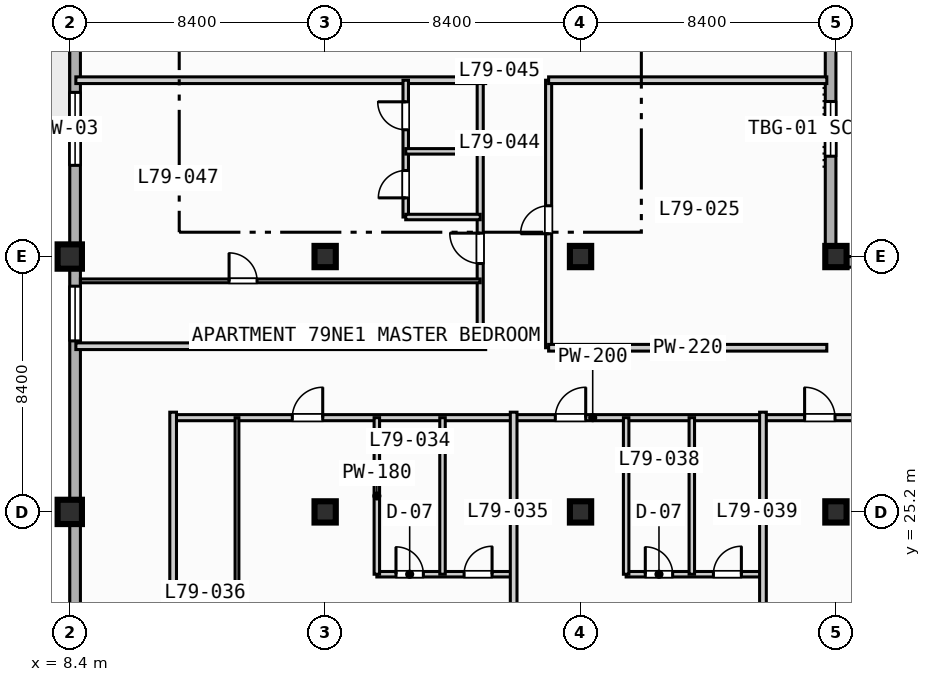
"""IFC4 building model, lengths in metres.
Left out: names, types, materials, properties, quantities, classifications, styles, units other than length and angle.
Written with IfcOpenShell. Run it as: python <this file> out.ifc"""

import sys

from ifc_helpers import new_model, si_unit, direction, frame, frame_2d, origin, origin_2d, place, context, subcontext, project, spatial, rectangle, extrude, element, fill, save


model = new_model("IFC4")
c1 = context("Model", 3, precision=1e-05, world=origin(), true_north=direction((0.0, 1.0)))
c2 = subcontext(c1, "Body", "Model", "MODEL_VIEW")
j1 = project(units=[si_unit("LENGTHUNIT", "METRE"), si_unit("PLANEANGLEUNIT", "RADIAN")], contexts=[c1])
p1 = place(None, origin())
s1 = spatial("IfcSite", under=j1, at=p1, CompositionType="ELEMENT")
p2 = place(p1, origin())
s2 = spatial("IfcBuilding", under=s1, at=p2, CompositionType="ELEMENT")
p3 = place(p2, frame((0.0, 0.0, 320.3)))
s3 = spatial("IfcBuildingStorey", under=s2, at=p3, CompositionType="ELEMENT", Elevation=320.3)
for number, where, z_axis, x_axis in (
    (1, (8.4, 25.2, 0.0), (0.0, 0.0, 1.0), (1.0, 0.0, 0.0)),
    (2, (8.4, 33.6, 0.0), (0.0, 0.0, 1.0), (1.0, 0.0, 0.0)),
):
    element("IfcColumn", number, at=place(p3, frame(where, z_axis=z_axis, x_axis=x_axis)), inside=s3, PredefinedType="COLUMN", context=c2, shape_type="SweptSolid", body=[
        extrude(rectangle(XDim=0.8, YDim=0.8, at=origin_2d()), origin(), (0.0, 0.0, 1.0), 3.9),
    ])
for number, where, z_axis, x_axis in (
    (3, (16.8, 25.2, 0.0), (0.0, 0.0, 1.0), (1.0, 0.0, 0.0)),
    (4, (16.8, 33.6, 0.0), (0.0, 0.0, 1.0), (1.0, 0.0, 0.0)),
    (5, (25.2, 25.2, 0.0), (0.0, 0.0, 1.0), (1.0, 0.0, 0.0)),
    (6, (25.2, 33.6, 0.0), (0.0, 0.0, 1.0), (1.0, 0.0, 0.0)),
    (7, (33.6, 25.2, 0.0), (0.0, 0.0, 1.0), (1.0, 0.0, 0.0)),
    (8, (33.6, 33.6, 0.0), (0.0, 0.0, 1.0), (1.0, 0.0, 0.0)),
):
    element("IfcColumn", number, at=place(p3, frame(where, z_axis=z_axis, x_axis=x_axis)), inside=s3, PredefinedType="COLUMN", context=c2, shape_type="SweptSolid", body=[
        extrude(rectangle(XDim=0.7, YDim=0.7, at=origin_2d()), origin(), (0.0, 0.0, 1.0), 3.9),
    ])
p4 = place(p3, frame((8.575, 11.575, 0.0), z_axis=(0.0, 0.0, 1.0), x_axis=(0.0, 1.0, 0.0)))
e9 = element("IfcWall", 9, at=p4, inside=s3, PredefinedType="STANDARD", context=c2, shape_type="SweptSolid", body=[
    extrude(rectangle(XDim=60.85, YDim=0.35, at=frame_2d((30.425, 0.0))), origin(), (0.0, 0.0, 1.0), 3.67),
])
p5 = place(p4, frame((33.925, 0.0, 0.0)))
e10 = element("IfcOpeningElement", 10, at=p5, cuts=e9, PredefinedType="OPENING", context=c2, shape_type="SweptSolid", body=[
    extrude(rectangle(XDim=1.4, YDim=2.2, at=frame_2d((0.7, 1.1))), frame((0.0, 0.185, 0.0), z_axis=(0.0, -1.0, 0.0), x_axis=(1.0, 0.0, 0.0)), (0.0, 0.0, 1.0), 0.37),
])
p6 = place(p4, frame((25.025, 0.0, 0.85)))
e11 = element("IfcOpeningElement", 11, at=p6, cuts=e9, PredefinedType="OPENING", context=c2, shape_type="SweptSolid", body=[
    extrude(rectangle(XDim=2.4, YDim=1.95, at=frame_2d((1.2, 0.975))), frame((0.0, 0.185, 0.0), z_axis=(0.0, -1.0, 0.0), x_axis=(1.0, 0.0, 0.0)), (0.0, 0.0, 1.0), 0.37),
])
p7 = place(p4, frame((41.825, 0.0, 0.85)))
e12 = element("IfcOpeningElement", 12, at=p7, cuts=e9, PredefinedType="OPENING", context=c2, shape_type="SweptSolid", body=[
    extrude(rectangle(XDim=2.4, YDim=1.95, at=frame_2d((1.2, 0.975))), frame((0.0, 0.185, 0.0), z_axis=(0.0, -1.0, 0.0), x_axis=(1.0, 0.0, 0.0)), (0.0, 0.0, 1.0), 0.37),
])
p8 = place(p4, frame((19.25, 0.0, 0.85)))
e13 = element("IfcOpeningElement", 13, at=p8, cuts=e9, PredefinedType="OPENING", context=c2, shape_type="SweptSolid", body=[
    extrude(rectangle(XDim=1.8, YDim=1.8, at=frame_2d((0.9, 0.9))), frame((0.0, 0.185, 0.0), z_axis=(0.0, -1.0, 0.0), x_axis=(1.0, 0.0, 0.0)), (0.0, 0.0, 1.0), 0.37),
])
p9 = place(p3, frame((33.425, 72.425, 0.0), z_axis=(0.0, 0.0, 1.0), x_axis=(0.0, -1.0, 0.0)))
e14 = element("IfcWall", 14, at=p9, inside=s3, PredefinedType="STANDARD", context=c2, shape_type="SweptSolid", body=[
    extrude(rectangle(XDim=39.0, YDim=0.35, at=frame_2d((19.5, 0.0))), origin(), (0.0, 0.0, 1.0), 3.67),
])
p10 = place(p9, frame((33.725, 0.0, 0.85)))
e15 = element("IfcOpeningElement", 15, at=p10, cuts=e14, PredefinedType="OPENING", context=c2, shape_type="SweptSolid", body=[
    extrude(rectangle(XDim=1.8, YDim=1.8, at=frame_2d((0.9, 0.9))), frame((0.0, 0.185, 0.0), z_axis=(0.0, -1.0, 0.0), x_axis=(1.0, 0.0, 0.0)), (0.0, 0.0, 1.0), 0.37),
])
p11 = place(p9, frame((8.225, 0.0, 0.85)))
e16 = element("IfcOpeningElement", 16, at=p11, cuts=e14, PredefinedType="OPENING", context=c2, shape_type="SweptSolid", body=[
    extrude(rectangle(XDim=2.4, YDim=1.95, at=frame_2d((1.2, 0.975))), frame((0.0, 0.185, 0.0), z_axis=(0.0, -1.0, 0.0), x_axis=(1.0, 0.0, 0.0)), (0.0, 0.0, 1.0), 0.37),
])
p12 = place(p3, frame((33.425, 33.425, 0.0), z_axis=(0.0, 0.0, 1.0), x_axis=(1.0, 0.0, 0.0)))
e17 = element("IfcWall", 17, at=p12, inside=s3, PredefinedType="STANDARD", context=c2, shape_type="SweptSolid", body=[
    extrude(rectangle(XDim=30.6, YDim=0.35, at=frame_2d((15.3, 0.0))), origin(), (0.0, 0.0, 1.0), 3.67),
])
p13 = place(p12, frame((12.075, 0.0, 0.0)))
e18 = element("IfcOpeningElement", 18, at=p13, cuts=e17, PredefinedType="OPENING", context=c2, shape_type="SweptSolid", body=[
    extrude(rectangle(XDim=1.4, YDim=2.2, at=frame_2d((0.7, 1.1))), frame((0.0, 0.185, 0.0), z_axis=(0.0, -1.0, 0.0), x_axis=(1.0, 0.0, 0.0)), (0.0, 0.0, 1.0), 0.37),
])
p14 = place(p3, frame((24.15, 30.6, 0.0), z_axis=(0.0, 0.0, 1.0), x_axis=(0.0, 1.0, 0.0)))
e19 = element("IfcWall", 19, at=p14, inside=s3, PredefinedType="PARTITIONING", context=c2, shape_type="SweptSolid", body=[
    extrude(rectangle(XDim=8.8, YDim=0.2, at=frame_2d((4.4, 0.0))), origin(), (0.0, 0.0, 1.0), 3.67),
])
p15 = place(p14, frame((3.75, 0.0, 0.0)))
e20 = element("IfcOpeningElement", 20, at=p15, cuts=e19, PredefinedType="OPENING", context=c2, shape_type="SweptSolid", body=[
    extrude(rectangle(XDim=0.92, YDim=2.1, at=frame_2d((0.46, 1.05))), frame((0.0, 0.11, 0.0), z_axis=(0.0, -1.0, 0.0), x_axis=(1.0, 0.0, 0.0)), (0.0, 0.0, 1.0), 0.22),
])
for number, where, z_axis, x_axis in (
    (21, (24.15, 30.6, 0.0), (0.0, 0.0, 1.0), (1.0, 0.0, 0.0)),
    (22, (24.15, 39.4, 0.0), (0.0, 0.0, 1.0), (1.0, 0.0, 0.0)),
):
    element("IfcWall", number, at=place(p3, frame(where, z_axis=z_axis, x_axis=x_axis)), inside=s3, PredefinedType="PARTITIONING", context=c2, shape_type="SweptSolid", body=[
        extrude(rectangle(XDim=9.15, YDim=0.22, at=frame_2d((4.575, 0.0))), origin(), (0.0, 0.0, 1.0), 3.67),
    ])
p16 = place(p3, frame((11.8, 28.3, 0.0), z_axis=(0.0, 0.0, 1.0), x_axis=(1.0, 0.0, 0.0)))
e23 = element("IfcWall", 23, at=p16, inside=s3, PredefinedType="PARTITIONING", context=c2, shape_type="SweptSolid", body=[
    extrude(rectangle(XDim=27.6, YDim=0.2, at=frame_2d((13.8, 0.0))), origin(), (0.0, 0.0, 1.0), 3.67),
])
p17 = place(p16, frame((3.92, 0.0, 0.0)))
e24 = element("IfcOpeningElement", 24, at=p17, cuts=e23, PredefinedType="OPENING", context=c2, shape_type="SweptSolid", body=[
    extrude(rectangle(XDim=1.0, YDim=2.15, at=frame_2d((0.5, 1.075))), frame((0.0, 0.11, 0.0), z_axis=(0.0, -1.0, 0.0), x_axis=(1.0, 0.0, 0.0)), (0.0, 0.0, 1.0), 0.22),
])
p18 = place(p16, frame((12.57, 0.0, 0.0)))
e25 = element("IfcOpeningElement", 25, at=p18, cuts=e23, PredefinedType="OPENING", context=c2, shape_type="SweptSolid", body=[
    extrude(rectangle(XDim=1.0, YDim=2.15, at=frame_2d((0.5, 1.075))), frame((0.0, 0.11, 0.0), z_axis=(0.0, -1.0, 0.0), x_axis=(1.0, 0.0, 0.0)), (0.0, 0.0, 1.0), 0.22),
])
p19 = place(p16, frame((20.77, 0.0, 0.0)))
e26 = element("IfcOpeningElement", 26, at=p19, cuts=e23, PredefinedType="OPENING", context=c2, shape_type="SweptSolid", body=[
    extrude(rectangle(XDim=1.0, YDim=2.15, at=frame_2d((0.5, 1.075))), frame((0.0, 0.11, 0.0), z_axis=(0.0, -1.0, 0.0), x_axis=(1.0, 0.0, 0.0)), (0.0, 0.0, 1.0), 0.22),
])
p20 = place(p3, frame((11.8, 8.6, 0.0), z_axis=(0.0, 0.0, 1.0), x_axis=(0.0, 1.0, 0.0)))
e27 = element("IfcWall", 27, at=p20, inside=s3, PredefinedType="PARTITIONING", context=c2, shape_type="SweptSolid", body=[
    extrude(rectangle(XDim=19.88, YDim=0.22, at=frame_2d((9.94, 0.0))), origin(), (0.0, 0.0, 1.0), 3.67),
])
p21 = place(p3, frame((18.5, 23.15, 0.0), z_axis=(0.0, 0.0, 1.0), x_axis=(1.0, 0.0, 0.0)))
e28 = element("IfcWall", 28, at=p21, inside=s3, PredefinedType="PLUMBINGWALL", context=c2, shape_type="SweptSolid", body=[
    extrude(rectangle(XDim=4.5, YDim=0.18, at=frame_2d((2.25, 0.0))), origin(), (0.0, 0.0, 1.0), 3.67),
])
p22 = place(p21, frame((0.63, 0.0, 0.0)))
e29 = element("IfcOpeningElement", 29, at=p22, cuts=e28, PredefinedType="OPENING", context=c2, shape_type="SweptSolid", body=[
    extrude(rectangle(XDim=0.9, YDim=2.1, at=frame_2d((0.45, 1.05))), frame((0.0, 0.1, 0.0), z_axis=(0.0, -1.0, 0.0), x_axis=(1.0, 0.0, 0.0)), (0.0, 0.0, 1.0), 0.2),
])
p23 = place(p21, frame((2.87, 0.0, 0.0)))
e30 = element("IfcOpeningElement", 30, at=p23, cuts=e28, PredefinedType="OPENING", context=c2, shape_type="SweptSolid", body=[
    extrude(rectangle(XDim=0.92, YDim=2.1, at=frame_2d((0.46, 1.05))), frame((0.0, 0.1, 0.0), z_axis=(0.0, -1.0, 0.0), x_axis=(1.0, 0.0, 0.0)), (0.0, 0.0, 1.0), 0.2),
])
for number, where, z_axis, x_axis in (
    (31, (18.5, 23.15, 0.0), (0.0, 0.0, 1.0), (0.0, 1.0, 0.0)),
    (32, (20.66, 23.15, 0.0), (0.0, 0.0, 1.0), (0.0, 1.0, 0.0)),
):
    element("IfcWall", number, at=place(p3, frame(where, z_axis=z_axis, x_axis=x_axis)), inside=s3, PredefinedType="PLUMBINGWALL", context=c2, shape_type="SweptSolid", body=[
        extrude(rectangle(XDim=5.15, YDim=0.18, at=frame_2d((2.575, 0.0))), origin(), (0.0, 0.0, 1.0), 3.67),
    ])
p24 = place(p3, frame((13.9, 8.75, 0.0), z_axis=(0.0, 0.0, 1.0), x_axis=(0.0, 1.0, 0.0)))
e33 = element("IfcWall", 33, at=p24, inside=s3, PredefinedType="PARTITIONING", context=c2, shape_type="SweptSolid", body=[
    extrude(rectangle(XDim=19.55, YDim=0.125, at=frame_2d((9.775, 0.0))), origin(), (0.0, 0.0, 1.0), 3.67),
])
p25 = place(p24, frame((6.74, 0.0, 0.0)))
e34 = element("IfcOpeningElement", 34, at=p25, cuts=e33, PredefinedType="OPENING", context=c2, shape_type="SweptSolid", body=[
    extrude(rectangle(XDim=0.92, YDim=2.1, at=frame_2d((0.46, 1.05))), frame((0.0, 0.073, 0.0), z_axis=(0.0, -1.0, 0.0), x_axis=(1.0, 0.0, 0.0)), (0.0, 0.0, 1.0), 0.145),
])
p26 = place(p3, frame((23.0, 8.6, 0.0), z_axis=(0.0, 0.0, 1.0), x_axis=(0.0, 1.0, 0.0)))
e35 = element("IfcWall", 35, at=p26, inside=s3, PredefinedType="PARTITIONING", context=c2, shape_type="SweptSolid", body=[
    extrude(rectangle(XDim=19.88, YDim=0.22, at=frame_2d((9.94, 0.0))), origin(), (0.0, 0.0, 1.0), 3.67),
])
p27 = place(p3, frame((26.7, 23.15, 0.0), z_axis=(0.0, 0.0, 1.0), x_axis=(1.0, 0.0, 0.0)))
e36 = element("IfcWall", 36, at=p27, inside=s3, PredefinedType="PLUMBINGWALL", context=c2, shape_type="SweptSolid", body=[
    extrude(rectangle(XDim=4.5, YDim=0.18, at=frame_2d((2.25, 0.0))), origin(), (0.0, 0.0, 1.0), 3.67),
])
p28 = place(p27, frame((0.63, 0.0, 0.0)))
e37 = element("IfcOpeningElement", 37, at=p28, cuts=e36, PredefinedType="OPENING", context=c2, shape_type="SweptSolid", body=[
    extrude(rectangle(XDim=0.9, YDim=2.1, at=frame_2d((0.45, 1.05))), frame((0.0, 0.1, 0.0), z_axis=(0.0, -1.0, 0.0), x_axis=(1.0, 0.0, 0.0)), (0.0, 0.0, 1.0), 0.2),
])
p29 = place(p27, frame((2.87, 0.0, 0.0)))
e38 = element("IfcOpeningElement", 38, at=p29, cuts=e36, PredefinedType="OPENING", context=c2, shape_type="SweptSolid", body=[
    extrude(rectangle(XDim=0.92, YDim=2.1, at=frame_2d((0.46, 1.05))), frame((0.0, 0.1, 0.0), z_axis=(0.0, -1.0, 0.0), x_axis=(1.0, 0.0, 0.0)), (0.0, 0.0, 1.0), 0.2),
])
for number, where, z_axis, x_axis in (
    (39, (26.7, 23.15, 0.0), (0.0, 0.0, 1.0), (0.0, 1.0, 0.0)),
    (40, (28.86, 23.15, 0.0), (0.0, 0.0, 1.0), (0.0, 1.0, 0.0)),
):
    element("IfcWall", number, at=place(p3, frame(where, z_axis=z_axis, x_axis=x_axis)), inside=s3, PredefinedType="PLUMBINGWALL", context=c2, shape_type="SweptSolid", body=[
        extrude(rectangle(XDim=5.15, YDim=0.18, at=frame_2d((2.575, 0.0))), origin(), (0.0, 0.0, 1.0), 3.67),
    ])
p30 = place(p3, frame((31.2, 8.6, 0.0), z_axis=(0.0, 0.0, 1.0), x_axis=(0.0, 1.0, 0.0)))
e41 = element("IfcWall", 41, at=p30, inside=s3, PredefinedType="PARTITIONING", context=c2, shape_type="SweptSolid", body=[
    extrude(rectangle(XDim=19.88, YDim=0.22, at=frame_2d((9.94, 0.0))), origin(), (0.0, 0.0, 1.0), 3.67),
])
p31 = place(p3, frame((21.9, 30.65, 0.0), z_axis=(0.0, 0.0, 1.0), x_axis=(0.0, 1.0, 0.0)))
e42 = element("IfcWall", 42, at=p31, inside=s3, PredefinedType="PARTITIONING", context=c2, shape_type="SweptSolid", body=[
    extrude(rectangle(XDim=8.75, YDim=0.2, at=frame_2d((4.375, 0.0))), origin(), (0.0, 0.0, 1.0), 3.67),
])
p32 = place(p31, frame((2.72, 0.0, 0.0)))
e43 = element("IfcOpeningElement", 43, at=p32, cuts=e42, PredefinedType="OPENING", context=c2, shape_type="SweptSolid", body=[
    extrude(rectangle(XDim=1.0, YDim=2.15, at=frame_2d((0.5, 1.075))), frame((0.0, 0.11, 0.0), z_axis=(0.0, -1.0, 0.0), x_axis=(1.0, 0.0, 0.0)), (0.0, 0.0, 1.0), 0.22),
])
for number, where, z_axis, x_axis in (
    (44, (8.6, 30.65, 0.0), (0.0, 0.0, 1.0), (1.0, 0.0, 0.0)),
    (45, (8.6, 39.4, 0.0), (0.0, 0.0, 1.0), (1.0, 0.0, 0.0)),
):
    element("IfcWall", number, at=place(p3, frame(where, z_axis=z_axis, x_axis=x_axis)), inside=s3, PredefinedType="PARTITIONING", context=c2, shape_type="SweptSolid", body=[
        extrude(rectangle(XDim=13.48, YDim=0.22, at=frame_2d((6.74, 0.0))), origin(), (0.0, 0.0, 1.0), 3.67),
    ])
p33 = place(p3, frame((19.45, 34.9, 0.0), z_axis=(0.0, 0.0, 1.0), x_axis=(0.0, 1.0, 0.0)))
e46 = element("IfcWall", 46, at=p33, inside=s3, PredefinedType="PLUMBINGWALL", context=c2, shape_type="SweptSolid", body=[
    extrude(rectangle(XDim=4.5, YDim=0.18, at=frame_2d((2.25, 0.0))), origin(), (0.0, 0.0, 1.0), 3.67),
])
p34 = place(p33, frame((0.63, 0.0, 0.0)))
e47 = element("IfcOpeningElement", 47, at=p34, cuts=e46, PredefinedType="OPENING", context=c2, shape_type="SweptSolid", body=[
    extrude(rectangle(XDim=0.9, YDim=2.1, at=frame_2d((0.45, 1.05))), frame((0.0, 0.1, 0.0), z_axis=(0.0, -1.0, 0.0), x_axis=(1.0, 0.0, 0.0)), (0.0, 0.0, 1.0), 0.2),
])
p35 = place(p33, frame((2.87, 0.0, 0.0)))
e48 = element("IfcOpeningElement", 48, at=p35, cuts=e46, PredefinedType="OPENING", context=c2, shape_type="SweptSolid", body=[
    extrude(rectangle(XDim=0.92, YDim=2.1, at=frame_2d((0.46, 1.05))), frame((0.0, 0.1, 0.0), z_axis=(0.0, -1.0, 0.0), x_axis=(1.0, 0.0, 0.0)), (0.0, 0.0, 1.0), 0.2),
])
for number, where, z_axis, x_axis in (
    (49, (19.45, 34.9, 0.0), (0.0, 0.0, 1.0), (1.0, 0.0, 0.0)),
    (50, (19.45, 37.06, 0.0), (0.0, 0.0, 1.0), (1.0, 0.0, 0.0)),
):
    element("IfcWall", number, at=place(p3, frame(where, z_axis=z_axis, x_axis=x_axis)), inside=s3, PredefinedType="PLUMBINGWALL", context=c2, shape_type="SweptSolid", body=[
        extrude(rectangle(XDim=2.45, YDim=0.18, at=frame_2d((1.225, 0.0))), origin(), (0.0, 0.0, 1.0), 3.67),
    ])
p36 = place(p3, frame((8.75, 32.8, 0.0), z_axis=(0.0, 0.0, 1.0), x_axis=(1.0, 0.0, 0.0)))
e51 = element("IfcWall", 51, at=p36, inside=s3, PredefinedType="PARTITIONING", context=c2, shape_type="SweptSolid", body=[
    extrude(rectangle(XDim=13.15, YDim=0.125, at=frame_2d((6.575, 0.0))), origin(), (0.0, 0.0, 1.0), 3.67),
])
p37 = place(p36, frame((4.89, 0.0, 0.0)))
e52 = element("IfcOpeningElement", 52, at=p37, cuts=e51, PredefinedType="OPENING", context=c2, shape_type="SweptSolid", body=[
    extrude(rectangle(XDim=0.92, YDim=2.1, at=frame_2d((0.46, 1.05))), frame((0.0, 0.073, 0.0), z_axis=(0.0, -1.0, 0.0), x_axis=(1.0, 0.0, 0.0)), (0.0, 0.0, 1.0), 0.145),
])
p38 = place(p6, origin())
e53 = element("IfcWindow", 53, at=p38, inside=s3, PartitioningType="SINGLE_PANEL", PredefinedType="WINDOW", context=c2, shape_type="SweptSolid", body=[
    extrude(rectangle(XDim=2.4, YDim=1.95, at=frame_2d((1.2, 0.975))), frame((0.0, 0.03, 0.0), z_axis=(0.0, -1.0, 0.0), x_axis=(1.0, 0.0, 0.0)), (0.0, 0.0, 1.0), 0.06),
])
fill(e11, e53)
p39 = place(p8, origin())
e54 = element("IfcWindow", 54, at=p39, inside=s3, PartitioningType="SINGLE_PANEL", PredefinedType="WINDOW", context=c2, shape_type="SweptSolid", body=[
    extrude(rectangle(XDim=1.8, YDim=1.8, at=frame_2d((0.9, 0.9))), frame((0.0, 0.03, 0.0), z_axis=(0.0, -1.0, 0.0), x_axis=(1.0, 0.0, 0.0)), (0.0, 0.0, 1.0), 0.06),
])
fill(e13, e54)
p40 = place(p10, origin())
e55 = element("IfcWindow", 55, at=p40, inside=s3, PartitioningType="SINGLE_PANEL", PredefinedType="WINDOW", context=c2, shape_type="SweptSolid", body=[
    extrude(rectangle(XDim=1.8, YDim=1.8, at=frame_2d((0.9, 0.9))), frame((0.0, 0.03, 0.0), z_axis=(0.0, -1.0, 0.0), x_axis=(1.0, 0.0, 0.0)), (0.0, 0.0, 1.0), 0.06),
])
fill(e15, e55)
p41 = place(p15, origin())
e56 = element("IfcDoor", 56, at=p41, inside=s3, OperationType="SINGLE_SWING_LEFT", PredefinedType="DOOR", context=c2, shape_type="SweptSolid", body=[
    extrude(rectangle(XDim=0.92, YDim=2.1, at=frame_2d((0.46, 1.05))), frame((0.0, 0.025, 0.0), z_axis=(0.0, -1.0, 0.0), x_axis=(1.0, 0.0, 0.0)), (0.0, 0.0, 1.0), 0.05),
])
fill(e20, e56)
p42 = place(p17, origin())
e57 = element("IfcDoor", 57, at=p42, inside=s3, OperationType="SINGLE_SWING_RIGHT", PredefinedType="DOOR", context=c2, shape_type="SweptSolid", body=[
    extrude(rectangle(XDim=1.0, YDim=2.15, at=frame_2d((0.5, 1.075))), frame((0.0, 0.025, 0.0), z_axis=(0.0, -1.0, 0.0), x_axis=(1.0, 0.0, 0.0)), (0.0, 0.0, 1.0), 0.05),
])
fill(e24, e57)
p43 = place(p18, origin())
e58 = element("IfcDoor", 58, at=p43, inside=s3, OperationType="SINGLE_SWING_RIGHT", PredefinedType="DOOR", context=c2, shape_type="SweptSolid", body=[
    extrude(rectangle(XDim=1.0, YDim=2.15, at=frame_2d((0.5, 1.075))), frame((0.0, 0.025, 0.0), z_axis=(0.0, -1.0, 0.0), x_axis=(1.0, 0.0, 0.0)), (0.0, 0.0, 1.0), 0.05),
])
fill(e25, e58)
p44 = place(p19, origin())
e59 = element("IfcDoor", 59, at=p44, inside=s3, OperationType="SINGLE_SWING_LEFT", PredefinedType="DOOR", context=c2, shape_type="SweptSolid", body=[
    extrude(rectangle(XDim=1.0, YDim=2.15, at=frame_2d((0.5, 1.075))), frame((0.0, 0.025, 0.0), z_axis=(0.0, -1.0, 0.0), x_axis=(1.0, 0.0, 0.0)), (0.0, 0.0, 1.0), 0.05),
])
fill(e26, e59)
p45 = place(p22, origin())
e60 = element("IfcDoor", 60, at=p45, inside=s3, OperationType="SINGLE_SWING_LEFT", PredefinedType="DOOR", context=c2, shape_type="SweptSolid", body=[
    extrude(rectangle(XDim=0.9, YDim=2.1, at=frame_2d((0.45, 1.05))), frame((0.0, 0.025, 0.0), z_axis=(0.0, -1.0, 0.0), x_axis=(1.0, 0.0, 0.0)), (0.0, 0.0, 1.0), 0.05),
])
fill(e29, e60)
p46 = place(p23, origin())
e61 = element("IfcDoor", 61, at=p46, inside=s3, OperationType="SINGLE_SWING_RIGHT", PredefinedType="DOOR", context=c2, shape_type="SweptSolid", body=[
    extrude(rectangle(XDim=0.92, YDim=2.1, at=frame_2d((0.46, 1.05))), frame((0.0, 0.025, 0.0), z_axis=(0.0, -1.0, 0.0), x_axis=(1.0, 0.0, 0.0)), (0.0, 0.0, 1.0), 0.05),
])
fill(e30, e61)
p47 = place(p28, origin())
e62 = element("IfcDoor", 62, at=p47, inside=s3, OperationType="SINGLE_SWING_LEFT", PredefinedType="DOOR", context=c2, shape_type="SweptSolid", body=[
    extrude(rectangle(XDim=0.9, YDim=2.1, at=frame_2d((0.45, 1.05))), frame((0.0, 0.025, 0.0), z_axis=(0.0, -1.0, 0.0), x_axis=(1.0, 0.0, 0.0)), (0.0, 0.0, 1.0), 0.05),
])
fill(e37, e62)
p48 = place(p29, origin())
e63 = element("IfcDoor", 63, at=p48, inside=s3, OperationType="SINGLE_SWING_RIGHT", PredefinedType="DOOR", context=c2, shape_type="SweptSolid", body=[
    extrude(rectangle(XDim=0.92, YDim=2.1, at=frame_2d((0.46, 1.05))), frame((0.0, 0.025, 0.0), z_axis=(0.0, -1.0, 0.0), x_axis=(1.0, 0.0, 0.0)), (0.0, 0.0, 1.0), 0.05),
])
fill(e38, e63)
p49 = place(p32, origin())
e64 = element("IfcDoor", 64, at=p49, inside=s3, OperationType="SINGLE_SWING_RIGHT", PredefinedType="DOOR", context=c2, shape_type="SweptSolid", body=[
    extrude(rectangle(XDim=1.0, YDim=2.15, at=frame_2d((0.5, 1.075))), frame((0.0, 0.025, 0.0), z_axis=(0.0, -1.0, 0.0), x_axis=(1.0, 0.0, 0.0)), (0.0, 0.0, 1.0), 0.05),
])
fill(e43, e64)
p50 = place(p34, origin())
e65 = element("IfcDoor", 65, at=p50, inside=s3, OperationType="SINGLE_SWING_LEFT", PredefinedType="DOOR", context=c2, shape_type="SweptSolid", body=[
    extrude(rectangle(XDim=0.9, YDim=2.1, at=frame_2d((0.45, 1.05))), frame((0.0, 0.025, 0.0), z_axis=(0.0, -1.0, 0.0), x_axis=(1.0, 0.0, 0.0)), (0.0, 0.0, 1.0), 0.05),
])
fill(e47, e65)
p51 = place(p35, origin())
e66 = element("IfcDoor", 66, at=p51, inside=s3, OperationType="SINGLE_SWING_RIGHT", PredefinedType="DOOR", context=c2, shape_type="SweptSolid", body=[
    extrude(rectangle(XDim=0.92, YDim=2.1, at=frame_2d((0.46, 1.05))), frame((0.0, 0.025, 0.0), z_axis=(0.0, -1.0, 0.0), x_axis=(1.0, 0.0, 0.0)), (0.0, 0.0, 1.0), 0.05),
])
fill(e48, e66)
p52 = place(p37, origin())
e67 = element("IfcDoor", 67, at=p52, inside=s3, OperationType="SINGLE_SWING_LEFT", PredefinedType="DOOR", context=c2, shape_type="SweptSolid", body=[
    extrude(rectangle(XDim=0.92, YDim=2.1, at=frame_2d((0.46, 1.05))), frame((0.0, 0.025, 0.0), z_axis=(0.0, -1.0, 0.0), x_axis=(1.0, 0.0, 0.0)), (0.0, 0.0, 1.0), 0.05),
])
fill(e52, e67)
save(model, sys.argv[1])
